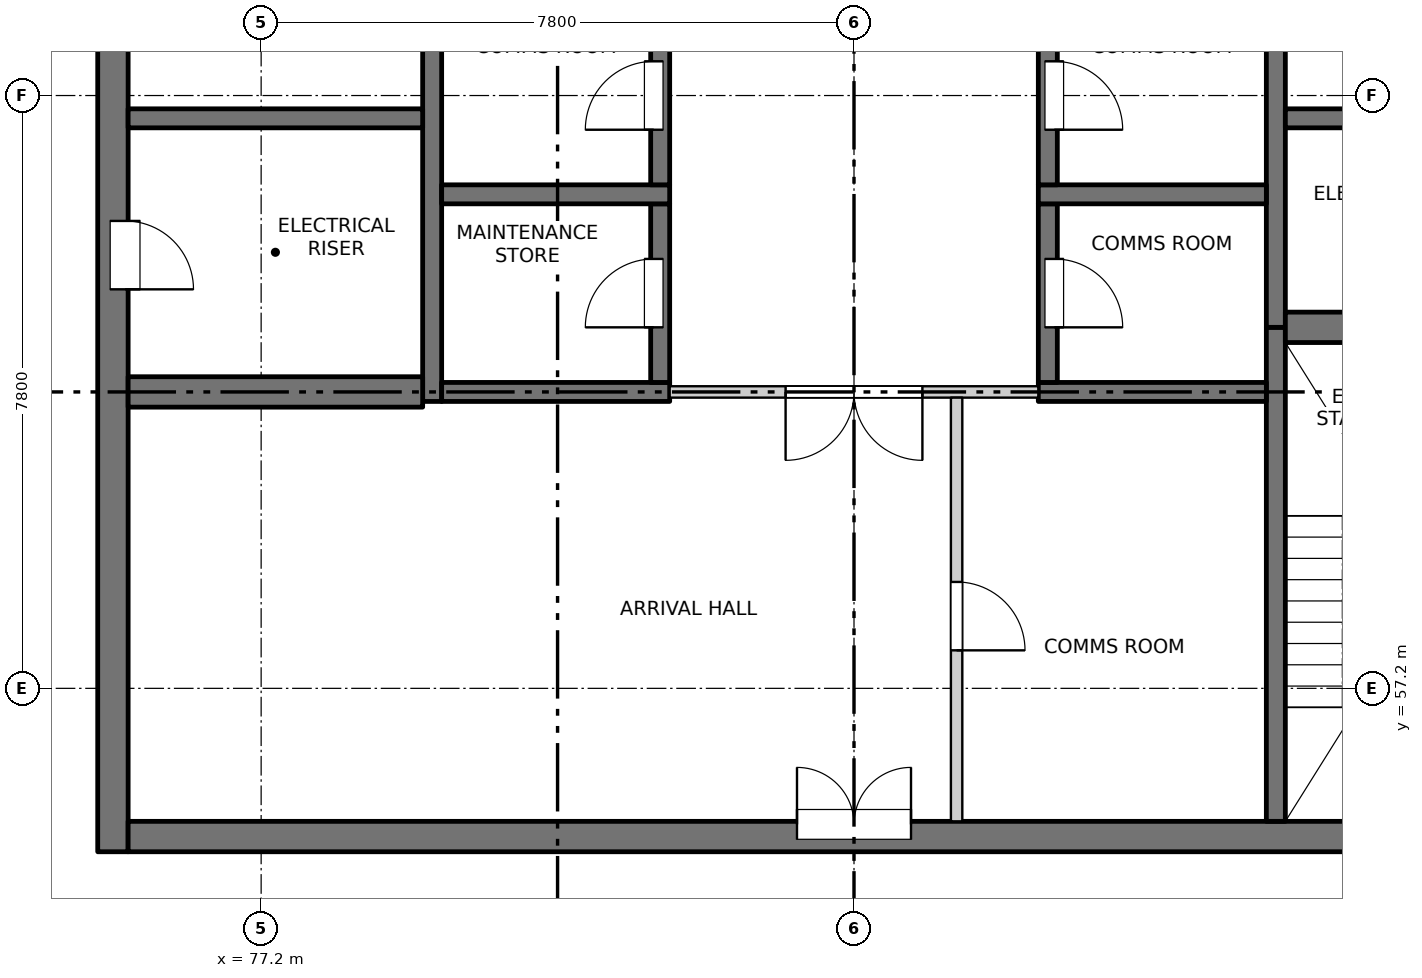
"""IFC4 building model, lengths in metres.
Left out: names, types, materials, properties, quantities, classifications, styles, units other than length and angle.
Written with IfcOpenShell. Run it as: python <this file> out.ifc"""

import sys

from ifc_helpers import new_model, si_unit, direction, frame, frame_2d, origin, place, context, subcontext, project, spatial, rectangle, extrude, element, fill, save


model = new_model("IFC4")
c1 = context("Model", 3, precision=1e-05, world=origin(), true_north=direction((0.0, 1.0)))
c2 = subcontext(c1, "Body", "Model", "MODEL_VIEW")
j1 = project(units=[si_unit("LENGTHUNIT", "METRE"), si_unit("PLANEANGLEUNIT", "RADIAN")], contexts=[c1])
p1 = place(None, origin())
s1 = spatial("IfcSite", under=j1, at=p1, CompositionType="ELEMENT")
p2 = place(p1, origin())
s2 = spatial("IfcBuilding", under=s1, at=p2, CompositionType="ELEMENT")
p3 = place(p2, frame((0.0, 0.0, 246.0)))
s3 = spatial("IfcBuildingStorey", under=s2, at=p3, CompositionType="ELEMENT", Elevation=246.0)
p4 = place(p3, frame((75.25, 55.05, -0.3), z_axis=(0.0, 0.0, 1.0), x_axis=(0.0, 1.0, 0.0)))
e1 = element("IfcWall", 1, at=p4, inside=s3, PredefinedType="SOLIDWALL", context=c2, shape_type="SweptSolid", body=[
    extrude(rectangle(XDim=22.25, YDim=0.4, at=frame_2d((11.125, 0.0))), origin(), (0.0, 0.0, 1.0), 3.45),
])
p5 = place(p4, frame((7.4, 0.0, 0.3)))
e2 = element("IfcOpeningElement", 2, at=p5, cuts=e1, PredefinedType="OPENING", context=c2, shape_type="SweptSolid", body=[
    extrude(rectangle(XDim=0.9, YDim=2.1, at=frame_2d((0.45, 1.05))), frame((0.0, 0.21, 0.0), z_axis=(0.0, -1.0, 0.0), x_axis=(1.0, 0.0, 0.0)), (0.0, 0.0, 1.0), 0.42),
])
p6 = place(p4, frame((12.05, 0.0, 0.3)))
e3 = element("IfcOpeningElement", 3, at=p6, cuts=e1, PredefinedType="OPENING", context=c2, shape_type="SweptSolid", body=[
    extrude(rectangle(XDim=0.9, YDim=2.1, at=frame_2d((0.45, 1.05))), frame((0.0, 0.21, 0.0), z_axis=(0.0, -1.0, 0.0), x_axis=(1.0, 0.0, 0.0)), (0.0, 0.0, 1.0), 0.42),
])
p7 = place(p4, frame((16.55, 0.0, 0.3)))
e4 = element("IfcOpeningElement", 4, at=p7, cuts=e1, PredefinedType="OPENING", context=c2, shape_type="SweptSolid", body=[
    extrude(rectangle(XDim=0.9, YDim=2.1, at=frame_2d((0.45, 1.05))), frame((0.0, 0.21, 0.0), z_axis=(0.0, -1.0, 0.0), x_axis=(1.0, 0.0, 0.0)), (0.0, 0.0, 1.0), 0.42),
])
p8 = place(p4, frame((20.0, 0.0, 0.3)))
e5 = element("IfcOpeningElement", 5, at=p8, cuts=e1, PredefinedType="OPENING", context=c2, shape_type="SweptSolid", body=[
    extrude(rectangle(XDim=0.9, YDim=2.1, at=frame_2d((0.45, 1.05))), frame((0.0, 0.21, 0.0), z_axis=(0.0, -1.0, 0.0), x_axis=(1.0, 0.0, 0.0)), (0.0, 0.0, 1.0), 0.42),
])
p9 = place(p3, frame((75.45, 55.25, -0.3), z_axis=(0.0, 0.0, 1.0), x_axis=(1.0, 0.0, 0.0)))
e6 = element("IfcWall", 6, at=p9, inside=s3, PredefinedType="SOLIDWALL", context=c2, shape_type="SweptSolid", body=[
    extrude(rectangle(XDim=19.1, YDim=0.4, at=frame_2d((9.55, 0.0))), origin(), (0.0, 0.0, 1.0), 3.45),
])
p10 = place(p9, frame((8.8, 0.0, 0.3)))
e7 = element("IfcOpeningElement", 7, at=p10, cuts=e6, PredefinedType="OPENING", context=c2, shape_type="SweptSolid", body=[
    extrude(rectangle(XDim=1.5, YDim=2.1, at=frame_2d((0.75, 1.05))), frame((0.0, 0.21, 0.0), z_axis=(0.0, -1.0, 0.0), x_axis=(1.0, 0.0, 0.0)), (0.0, 0.0, 1.0), 0.42),
])
p11 = place(p3, frame((79.45, 60.975, -0.3), z_axis=(0.0, 0.0, 1.0), x_axis=(0.0, 1.0, 0.0)))
e8 = element("IfcWall", 8, at=p11, inside=s3, PredefinedType="SOLIDWALL", context=c2, shape_type="SweptSolid", body=[
    extrude(rectangle(XDim=16.325, YDim=0.25, at=frame_2d((8.163, 0.0))), origin(), (0.0, 0.0, 1.0), 3.45),
])
p12 = place(p3, frame((90.55, 55.45, -0.3), z_axis=(0.0, 0.0, 1.0), x_axis=(0.0, 1.0, 0.0)))
e9 = element("IfcWall", 9, at=p12, inside=s3, PredefinedType="SOLIDWALL", context=c2, shape_type="SweptSolid", body=[
    extrude(rectangle(XDim=6.5, YDim=0.25, at=frame_2d((3.25, 0.0))), origin(), (0.0, 0.0, 1.0), 3.45),
])
p13 = place(p3, frame((90.55, 61.95, -0.3), z_axis=(0.0, 0.0, 1.0), x_axis=(0.0, 1.0, 0.0)))
e10 = element("IfcWall", 10, at=p13, inside=s3, PredefinedType="SOLIDWALL", context=c2, shape_type="SweptSolid", body=[
    extrude(rectangle(XDim=15.35, YDim=0.25, at=frame_2d((7.675, 0.0))), origin(), (0.0, 0.0, 1.0), 3.45),
])
p14 = place(p3, frame((79.575, 61.1, -0.3), z_axis=(0.0, 0.0, 1.0), x_axis=(1.0, 0.0, 0.0)))
e11 = element("IfcWall", 11, at=p14, inside=s3, PredefinedType="SOLIDWALL", context=c2, shape_type="SweptSolid", body=[
    extrude(rectangle(XDim=3.0, YDim=0.25, at=frame_2d((1.5, 0.0))), origin(), (0.0, 0.0, 1.0), 3.45),
])
p15 = place(p3, frame((82.45, 61.225, -0.3), z_axis=(0.0, 0.0, 1.0), x_axis=(0.0, 1.0, 0.0)))
e12 = element("IfcWall", 12, at=p15, inside=s3, PredefinedType="SOLIDWALL", context=c2, shape_type="SweptSolid", body=[
    extrude(rectangle(XDim=2.35, YDim=0.25, at=frame_2d((1.175, 0.0))), origin(), (0.0, 0.0, 1.0), 3.45),
])
p16 = place(p15, frame((0.725, 0.0, 0.3)))
e13 = element("IfcOpeningElement", 13, at=p16, cuts=e12, PredefinedType="OPENING", context=c2, shape_type="SweptSolid", body=[
    extrude(rectangle(XDim=0.9, YDim=2.1, at=frame_2d((0.45, 1.05))), frame((0.0, 0.135, 0.0), z_axis=(0.0, -1.0, 0.0), x_axis=(1.0, 0.0, 0.0)), (0.0, 0.0, 1.0), 0.27),
])
p17 = place(p3, frame((79.575, 63.7, -0.3), z_axis=(0.0, 0.0, 1.0), x_axis=(1.0, 0.0, 0.0)))
e14 = element("IfcWall", 14, at=p17, inside=s3, PredefinedType="SOLIDWALL", context=c2, shape_type="SweptSolid", body=[
    extrude(rectangle(XDim=3.0, YDim=0.25, at=frame_2d((1.5, 0.0))), origin(), (0.0, 0.0, 1.0), 3.45),
])
p18 = place(p3, frame((82.45, 63.825, -0.3), z_axis=(0.0, 0.0, 1.0), x_axis=(0.0, 1.0, 0.0)))
e15 = element("IfcWall", 15, at=p18, inside=s3, PredefinedType="SOLIDWALL", context=c2, shape_type="SweptSolid", body=[
    extrude(rectangle(XDim=2.35, YDim=0.25, at=frame_2d((1.175, 0.0))), origin(), (0.0, 0.0, 1.0), 3.45),
])
p19 = place(p18, frame((0.725, 0.0, 0.3)))
e16 = element("IfcOpeningElement", 16, at=p19, cuts=e15, PredefinedType="OPENING", context=c2, shape_type="SweptSolid", body=[
    extrude(rectangle(XDim=0.9, YDim=2.1, at=frame_2d((0.45, 1.05))), frame((0.0, 0.135, 0.0), z_axis=(0.0, -1.0, 0.0), x_axis=(1.0, 0.0, 0.0)), (0.0, 0.0, 1.0), 0.27),
])
p20 = place(p3, frame((87.425, 61.1, -0.3), z_axis=(0.0, 0.0, 1.0), x_axis=(1.0, 0.0, 0.0)))
e17 = element("IfcWall", 17, at=p20, inside=s3, PredefinedType="SOLIDWALL", context=c2, shape_type="SweptSolid", body=[
    extrude(rectangle(XDim=3.0, YDim=0.25, at=frame_2d((1.5, 0.0))), origin(), (0.0, 0.0, 1.0), 3.45),
])
p21 = place(p3, frame((87.55, 61.225, -0.3), z_axis=(0.0, 0.0, 1.0), x_axis=(0.0, 1.0, 0.0)))
e18 = element("IfcWall", 18, at=p21, inside=s3, PredefinedType="SOLIDWALL", context=c2, shape_type="SweptSolid", body=[
    extrude(rectangle(XDim=2.35, YDim=0.25, at=frame_2d((1.175, 0.0))), origin(), (0.0, 0.0, 1.0), 3.45),
])
p22 = place(p21, frame((0.725, 0.0, 0.3)))
e19 = element("IfcOpeningElement", 19, at=p22, cuts=e18, PredefinedType="OPENING", context=c2, shape_type="SweptSolid", body=[
    extrude(rectangle(XDim=0.9, YDim=2.1, at=frame_2d((0.45, 1.05))), frame((0.0, 0.135, 0.0), z_axis=(0.0, -1.0, 0.0), x_axis=(1.0, 0.0, 0.0)), (0.0, 0.0, 1.0), 0.27),
])
p23 = place(p3, frame((87.425, 63.7, -0.3), z_axis=(0.0, 0.0, 1.0), x_axis=(1.0, 0.0, 0.0)))
e20 = element("IfcWall", 20, at=p23, inside=s3, PredefinedType="SOLIDWALL", context=c2, shape_type="SweptSolid", body=[
    extrude(rectangle(XDim=3.0, YDim=0.25, at=frame_2d((1.5, 0.0))), origin(), (0.0, 0.0, 1.0), 3.45),
])
p24 = place(p3, frame((87.55, 63.825, -0.3), z_axis=(0.0, 0.0, 1.0), x_axis=(0.0, 1.0, 0.0)))
e21 = element("IfcWall", 21, at=p24, inside=s3, PredefinedType="SOLIDWALL", context=c2, shape_type="SweptSolid", body=[
    extrude(rectangle(XDim=2.35, YDim=0.25, at=frame_2d((1.175, 0.0))), origin(), (0.0, 0.0, 1.0), 3.45),
])
p25 = place(p24, frame((0.725, 0.0, 0.3)))
e22 = element("IfcOpeningElement", 22, at=p25, cuts=e21, PredefinedType="OPENING", context=c2, shape_type="SweptSolid", body=[
    extrude(rectangle(XDim=0.9, YDim=2.1, at=frame_2d((0.45, 1.05))), frame((0.0, 0.135, 0.0), z_axis=(0.0, -1.0, 0.0), x_axis=(1.0, 0.0, 0.0)), (0.0, 0.0, 1.0), 0.27),
])
p26 = place(p3, frame((75.45, 61.1, -0.3), z_axis=(0.0, 0.0, 1.0), x_axis=(1.0, 0.0, 0.0)))
e23 = element("IfcWall", 23, at=p26, inside=s3, PredefinedType="SOLIDWALL", context=c2, shape_type="SweptSolid", body=[
    extrude(rectangle(XDim=3.875, YDim=0.4, at=frame_2d((1.938, 0.0))), origin(), (0.0, 0.0, 1.0), 3.45),
])
p27 = place(p3, frame((75.45, 64.7, -0.3), z_axis=(0.0, 0.0, 1.0), x_axis=(1.0, 0.0, 0.0)))
e24 = element("IfcWall", 24, at=p27, inside=s3, PredefinedType="SOLIDWALL", context=c2, shape_type="SweptSolid", body=[
    extrude(rectangle(XDim=3.875, YDim=0.25, at=frame_2d((1.938, 0.0))), origin(), (0.0, 0.0, 1.0), 3.45),
])
p28 = place(p3, frame((90.675, 61.95, -0.3), z_axis=(0.0, 0.0, 1.0), x_axis=(1.0, 0.0, 0.0)))
e25 = element("IfcWall", 25, at=p28, inside=s3, PredefinedType="SOLIDWALL", context=c2, shape_type="SweptSolid", body=[
    extrude(rectangle(XDim=3.875, YDim=0.4, at=frame_2d((1.938, 0.0))), origin(), (0.0, 0.0, 1.0), 3.45),
])
p29 = place(p3, frame((90.675, 64.7, -0.3), z_axis=(0.0, 0.0, 1.0), x_axis=(1.0, 0.0, 0.0)))
e26 = element("IfcWall", 26, at=p29, inside=s3, PredefinedType="SOLIDWALL", context=c2, shape_type="SweptSolid", body=[
    extrude(rectangle(XDim=3.875, YDim=0.25, at=frame_2d((1.938, 0.0))), origin(), (0.0, 0.0, 1.0), 3.45),
])
p30 = place(p3, frame((82.575, 61.1, 0.0), z_axis=(0.0, 0.0, 1.0), x_axis=(1.0, 0.0, 0.0)))
e27 = element("IfcWall", 27, at=p30, inside=s3, PredefinedType="PARTITIONING", context=c2, shape_type="SweptSolid", body=[
    extrude(rectangle(XDim=4.85, YDim=0.15, at=frame_2d((2.425, 0.0))), origin(), (0.0, 0.0, 1.0), 3.15),
])
p31 = place(p30, frame((1.525, 0.0, 0.0)))
e28 = element("IfcOpeningElement", 28, at=p31, cuts=e27, PredefinedType="OPENING", context=c2, shape_type="SweptSolid", body=[
    extrude(rectangle(XDim=1.8, YDim=2.1, at=frame_2d((0.9, 1.05))), frame((0.0, 0.085, 0.0), z_axis=(0.0, -1.0, 0.0), x_axis=(1.0, 0.0, 0.0)), (0.0, 0.0, 1.0), 0.17),
])
p32 = place(p3, frame((86.35, 55.45, 0.0), z_axis=(0.0, 0.0, 1.0), x_axis=(0.0, 1.0, 0.0)))
e29 = element("IfcWall", 29, at=p32, inside=s3, PredefinedType="PARTITIONING", context=c2, shape_type="SweptSolid", body=[
    extrude(rectangle(XDim=5.575, YDim=0.15, at=frame_2d((2.788, 0.0))), origin(), (0.0, 0.0, 1.0), 3.15),
])
p33 = place(p32, frame((2.25, 0.0, 0.0)))
e30 = element("IfcOpeningElement", 30, at=p33, cuts=e29, PredefinedType="OPENING", context=c2, shape_type="SweptSolid", body=[
    extrude(rectangle(XDim=0.9, YDim=2.1, at=frame_2d((0.45, 1.05))), frame((0.0, 0.085, 0.0), z_axis=(0.0, -1.0, 0.0), x_axis=(1.0, 0.0, 0.0)), (0.0, 0.0, 1.0), 0.17),
])
p34 = place(p10, origin())
e31 = element("IfcDoor", 31, at=p34, inside=s3, OperationType="DOUBLE_DOOR_SINGLE_SWING", PredefinedType="DOOR", context=c2, shape_type="SweptSolid", body=[
    extrude(rectangle(XDim=1.5, YDim=2.1, at=frame_2d((0.75, 1.05))), frame((0.0, 0.185, 0.0), z_axis=(0.0, -1.0, 0.0), x_axis=(1.0, 0.0, 0.0)), (0.0, 0.0, 1.0), 0.05),
])
fill(e7, e31)
p35 = place(p33, origin())
e32 = element("IfcDoor", 32, at=p35, inside=s3, OperationType="SINGLE_SWING_RIGHT", PredefinedType="DOOR", context=c2, shape_type="SweptSolid", body=[
    extrude(rectangle(XDim=0.9, YDim=2.1, at=frame_2d((0.45, 1.05))), frame((0.0, 0.025, 0.0), z_axis=(0.0, -1.0, 0.0), x_axis=(1.0, 0.0, 0.0)), (0.0, 0.0, 1.0), 0.05),
])
fill(e30, e32)
p36 = place(p31, origin())
e33 = element("IfcDoor", 33, at=p36, inside=s3, OperationType="DOUBLE_DOOR_SINGLE_SWING", PredefinedType="DOOR", context=c2, shape_type="SweptSolid", body=[
    extrude(rectangle(XDim=1.8, YDim=2.1, at=frame_2d((0.9, 1.05))), frame((0.0, 0.025, 0.0), z_axis=(0.0, -1.0, 0.0), x_axis=(1.0, 0.0, 0.0)), (0.0, 0.0, 1.0), 0.05),
])
fill(e28, e33)
p37 = place(p16, origin())
e34 = element("IfcDoor", 34, at=p37, inside=s3, OperationType="SINGLE_SWING_LEFT", PredefinedType="DOOR", context=c2, shape_type="SweptSolid", body=[
    extrude(rectangle(XDim=0.9, YDim=2.1, at=frame_2d((0.45, 1.05))), frame((0.0, 0.11, 0.0), z_axis=(0.0, -1.0, 0.0), x_axis=(1.0, 0.0, 0.0)), (0.0, 0.0, 1.0), 0.05),
])
fill(e13, e34)
p38 = place(p22, origin())
e35 = element("IfcDoor", 35, at=p38, inside=s3, OperationType="SINGLE_SWING_RIGHT", PredefinedType="DOOR", context=c2, shape_type="SweptSolid", body=[
    extrude(rectangle(XDim=0.9, YDim=2.1, at=frame_2d((0.45, 1.05))), frame((0.0, -0.06, 0.0), z_axis=(0.0, -1.0, 0.0), x_axis=(1.0, 0.0, 0.0)), (0.0, 0.0, 1.0), 0.05),
])
fill(e19, e35)
p39 = place(p5, origin())
e36 = element("IfcDoor", 36, at=p39, inside=s3, OperationType="SINGLE_SWING_RIGHT", PredefinedType="DOOR", context=c2, shape_type="SweptSolid", body=[
    extrude(rectangle(XDim=0.9, YDim=2.1, at=frame_2d((0.45, 1.05))), frame((0.0, -0.135, 0.0), z_axis=(0.0, -1.0, 0.0), x_axis=(1.0, 0.0, 0.0)), (0.0, 0.0, 1.0), 0.05),
])
fill(e2, e36)
p40 = place(p19, origin())
e37 = element("IfcDoor", 37, at=p40, inside=s3, OperationType="SINGLE_SWING_LEFT", PredefinedType="DOOR", context=c2, shape_type="SweptSolid", body=[
    extrude(rectangle(XDim=0.9, YDim=2.1, at=frame_2d((0.45, 1.05))), frame((0.0, 0.11, 0.0), z_axis=(0.0, -1.0, 0.0), x_axis=(1.0, 0.0, 0.0)), (0.0, 0.0, 1.0), 0.05),
])
fill(e16, e37)
p41 = place(p25, origin())
e38 = element("IfcDoor", 38, at=p41, inside=s3, OperationType="SINGLE_SWING_RIGHT", PredefinedType="DOOR", context=c2, shape_type="SweptSolid", body=[
    extrude(rectangle(XDim=0.9, YDim=2.1, at=frame_2d((0.45, 1.05))), frame((0.0, -0.06, 0.0), z_axis=(0.0, -1.0, 0.0), x_axis=(1.0, 0.0, 0.0)), (0.0, 0.0, 1.0), 0.05),
])
fill(e22, e38)
save(model, sys.argv[1])
